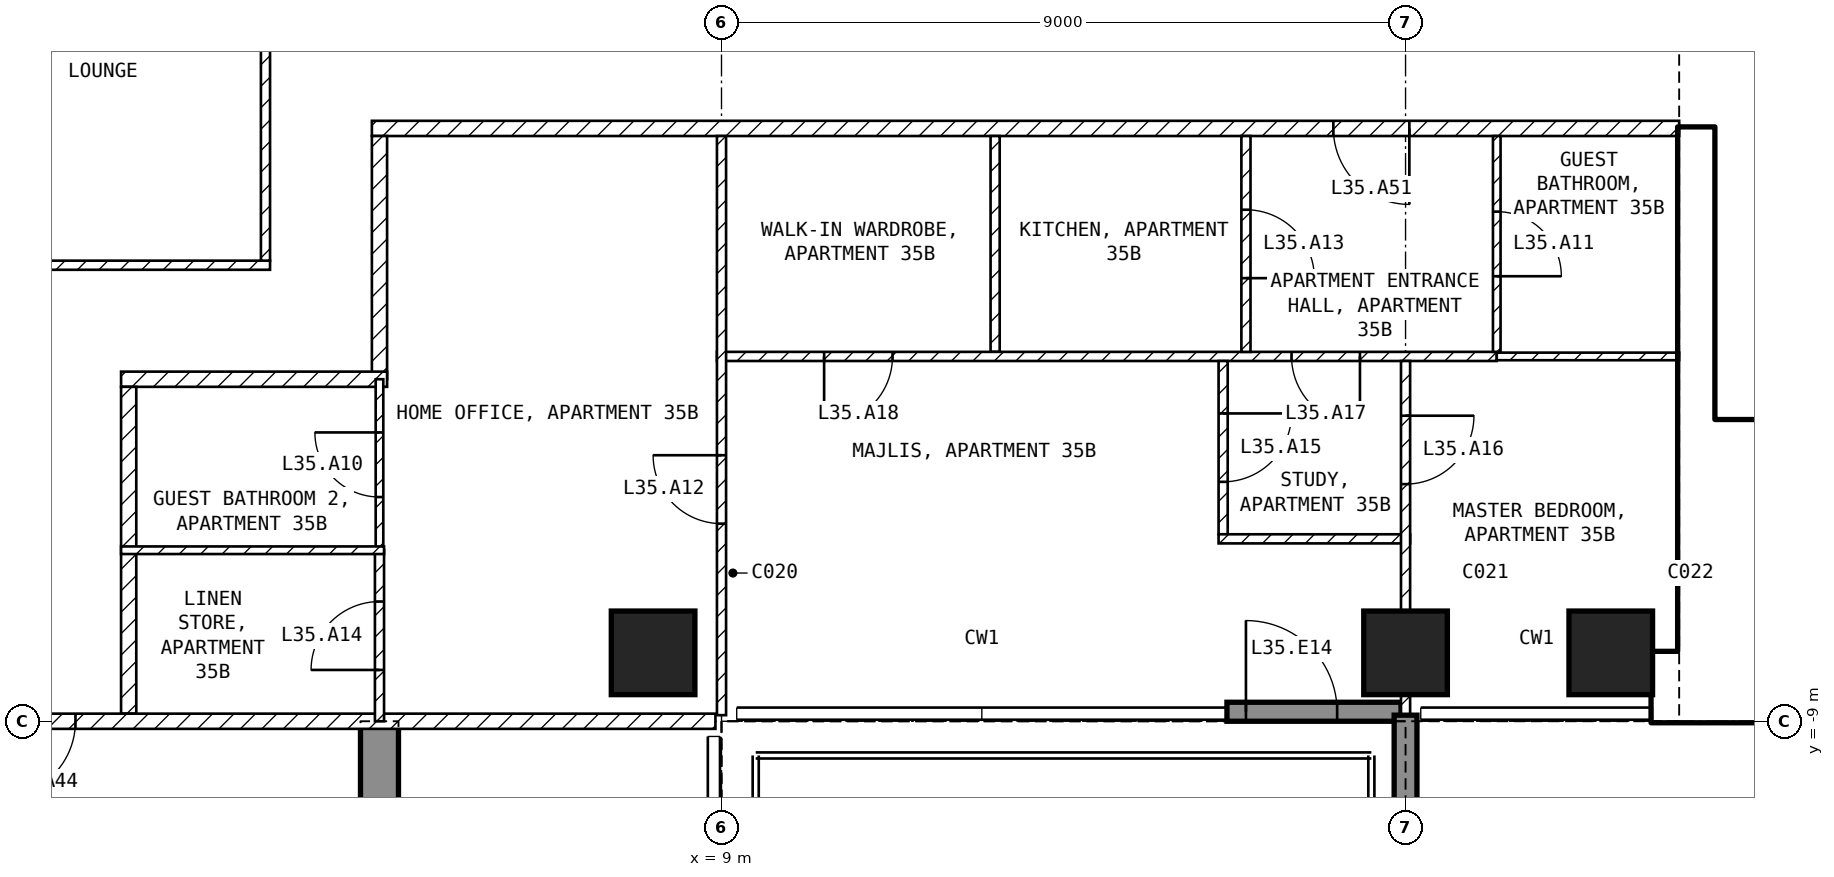
"""IFC4 building model, lengths in metres.
Left out: names, types, materials, properties, quantities, classifications, styles, units other than length and angle.
Written with IfcOpenShell. Run it as: python <this file> out.ifc"""

import sys

from ifc_helpers import new_model, si_unit, direction, frame, frame_2d, origin, origin_2d, place, context, subcontext, project, spatial, polyline, rectangle, outline, extrude, element, fill, save


model = new_model("IFC4")
c1 = context("Model", 3, precision=1e-05, world=origin(), true_north=direction((0.0, 1.0)))
c2 = subcontext(c1, "Body", "Model", "MODEL_VIEW")
j1 = project(units=[si_unit("LENGTHUNIT", "METRE"), si_unit("PLANEANGLEUNIT", "RADIAN")], contexts=[c1])
p1 = place(None, origin())
s1 = spatial("IfcSite", under=j1, at=p1, CompositionType="ELEMENT")
p2 = place(p1, origin())
s2 = spatial("IfcBuilding", under=s1, at=p2, CompositionType="ELEMENT")
p3 = place(p2, frame((0.0, 0.0, 144.4)))
s3 = spatial("IfcBuildingStorey", under=s2, at=p3, CompositionType="ELEMENT", Elevation=144.4)
for number, where, z_axis, x_axis in (
    (1, (8.1, -8.1, -0.25), (0.0, 0.0, 1.0), (1.0, 0.0, 0.0)),
    (2, (18.0, -8.1, -0.25), (0.0, 0.0, 1.0), (1.0, 0.0, 0.0)),
    (3, (20.7, -8.1, -0.25), (0.0, 0.0, 1.0), (1.0, 0.0, 0.0)),
):
    element("IfcColumn", number, at=place(p3, frame(where, z_axis=z_axis, x_axis=x_axis)), inside=s3, PredefinedType="COLUMN", context=c2, shape_type="SweptSolid", body=[
        extrude(rectangle(XDim=1.1, YDim=1.1, at=origin_2d()), origin(), (0.0, 0.0, 1.0), 3.5),
    ])
p4 = place(p3, frame((4.25, -20.15, -0.25), z_axis=(1.0, 0.0, 0.0), x_axis=(0.0, 1.0, 0.0)))
e4 = element("IfcWall", 4, at=p4, inside=s3, PredefinedType="SHEAR", context=c2, shape_type="SweptSolid", body=[
    extrude(outline(polyline([(0.0, 0.0), (6.65, 0.0), (6.65, 2.65), (9.05, 2.65), (9.05, 0.0), (11.15, 0.0), (11.15, 3.5), (0.0, 3.5), (0.0, 0.0)])), origin(), (0.0, 0.0, 1.0), 0.5),
])
p5 = place(p3, frame((15.65, -8.875, 0.0), z_axis=(0.0, 0.0, 1.0), x_axis=(1.0, 0.0, 0.0)))
e5 = element("IfcWall", 5, at=p5, inside=s3, PredefinedType="SOLIDWALL", context=c2, shape_type="SweptSolid", body=[
    extrude(rectangle(XDim=2.29, YDim=0.25, at=frame_2d((1.145, 0.0))), origin(), (0.0, 0.0, 1.0), 3.25),
])
p6 = place(p5, frame((0.25, 0.0, 0.0)))
e6 = element("IfcOpeningElement", 6, at=p6, cuts=e5, PredefinedType="OPENING", context=c2, shape_type="SweptSolid", body=[
    extrude(rectangle(XDim=1.2, YDim=2.4, at=frame_2d((0.6, 1.2))), frame((0.0, 0.135, 0.0), z_axis=(0.0, -1.0, 0.0), x_axis=(1.0, 0.0, 0.0)), (0.0, 0.0, 1.0), 0.27),
])
p7 = place(p3, frame((18.0, -8.92, 0.0), z_axis=(0.0, 0.0, 1.0), x_axis=(0.0, -1.0, 0.0)))
e7 = element("IfcWall", 7, at=p7, inside=s3, PredefinedType="SOLIDWALL", context=c2, shape_type="SweptSolid", body=[
    extrude(rectangle(XDim=2.82, YDim=0.3, at=frame_2d((1.41, 0.0))), origin(), (0.0, 0.0, 1.0), 3.25),
])
p8 = place(p3, frame((21.25, -8.55, 0.0), z_axis=(0.0, 0.0, 1.0), x_axis=(1.0, 0.0, 0.0)))
e8 = element("IfcWall", 8, at=p8, inside=s3, PredefinedType="SHEAR", context=c2, shape_type="SweptSolid", body=[
    extrude(rectangle(XDim=8.95, YDim=0.9, at=frame_2d((4.475, 0.0))), origin(), (0.0, 0.0, 1.0), 3.25),
])
p9 = place(p3, frame((21.825, -8.1, 0.0), z_axis=(0.0, 0.0, 1.0), x_axis=(0.0, 1.0, 0.0)))
e9 = element("IfcWall", 9, at=p9, inside=s3, PredefinedType="SHEAR", context=c2, shape_type="SweptSolid", body=[
    extrude(rectangle(XDim=6.9, YDim=0.45, at=frame_2d((3.45, 0.0))), origin(), (0.0, 0.0, 1.0), 3.25),
])
p10 = place(p3, frame((22.05, -5.15, 0.0), z_axis=(0.0, 0.0, 1.0), x_axis=(1.0, 0.0, 0.0)))
e10 = element("IfcWall", 10, at=p10, inside=s3, PredefinedType="SOLIDWALL", context=c2, shape_type="SweptSolid", body=[
    extrude(rectangle(XDim=6.3, YDim=0.2, at=frame_2d((3.15, 0.0))), origin(), (0.0, 0.0, 1.0), 3.25),
])
p11 = place(p10, frame((0.2, 0.0, 0.0)))
e11 = element("IfcOpeningElement", 11, at=p11, cuts=e10, PredefinedType="OPENING", context=c2, shape_type="SweptSolid", body=[
    extrude(rectangle(XDim=1.0, YDim=2.1, at=frame_2d((0.5, 1.05))), frame((0.0, 0.11, 0.0), z_axis=(0.0, -1.0, 0.0), x_axis=(1.0, 0.0, 0.0)), (0.0, 0.0, 1.0), 0.22),
])
p12 = place(p3, frame((-3.06, -3.0, 0.0), z_axis=(0.0, 0.0, 1.0), x_axis=(1.0, 0.0, 0.0)))
e12 = element("IfcWall", 12, at=p12, inside=s3, PredefinedType="PARTITIONING", context=c2, shape_type="SweptSolid", body=[
    extrude(rectangle(XDim=6.12, YDim=0.12, at=frame_2d((3.06, 0.0))), origin(), (0.0, 0.0, 1.0), 3.25),
])
p13 = place(p3, frame((3.0, -2.94, 0.0), z_axis=(0.0, 0.0, 1.0), x_axis=(0.0, 1.0, 0.0)))
e13 = element("IfcWall", 13, at=p13, inside=s3, PredefinedType="PARTITIONING", context=c2, shape_type="SweptSolid", body=[
    extrude(rectangle(XDim=5.88, YDim=0.12, at=frame_2d((2.94, 0.0))), origin(), (0.0, 0.0, 1.0), 3.25),
])
p14 = place(p3, frame((21.6, -1.2, 0.0), z_axis=(0.0, 0.0, 1.0), x_axis=(-1.0, 0.0, 0.0)))
e14 = element("IfcWall", 14, at=p14, inside=s3, PredefinedType="PARTITIONING", context=c2, shape_type="SweptSolid", body=[
    extrude(rectangle(XDim=17.2, YDim=0.2, at=frame_2d((8.6, 0.0))), origin(), (0.0, 0.0, 1.0), 3.25),
])
p15 = place(p14, frame((3.55, 0.0, 0.0)))
e15 = element("IfcOpeningElement", 15, at=p15, cuts=e14, PredefinedType="OPENING", context=c2, shape_type="SweptSolid", body=[
    extrude(rectangle(XDim=1.0, YDim=2.1, at=frame_2d((0.5, 1.05))), frame((0.0, 0.11, 0.0), z_axis=(0.0, -1.0, 0.0), x_axis=(1.0, 0.0, 0.0)), (0.0, 0.0, 1.0), 0.22),
])
p16 = place(p3, frame((4.5, -1.3, 0.0), z_axis=(0.0, 0.0, 1.0), x_axis=(0.0, -1.0, 0.0)))
e16 = element("IfcWall", 16, at=p16, inside=s3, PredefinedType="PARTITIONING", context=c2, shape_type="SweptSolid", body=[
    extrude(rectangle(XDim=3.2, YDim=0.2, at=frame_2d((1.6, 0.0))), origin(), (0.0, 0.0, 1.0), 3.25),
])
p17 = place(p3, frame((4.6, -4.5, 0.0), z_axis=(0.0, 0.0, 1.0), x_axis=(-1.0, 0.0, 0.0)))
e17 = element("IfcWall", 17, at=p17, inside=s3, PredefinedType="PARTITIONING", context=c2, shape_type="SweptSolid", body=[
    extrude(rectangle(XDim=3.5, YDim=0.2, at=frame_2d((1.75, 0.0))), origin(), (0.0, 0.0, 1.0), 3.25),
])
p18 = place(p3, frame((1.2, -4.6, 0.0), z_axis=(0.0, 0.0, 1.0), x_axis=(0.0, -1.0, 0.0)))
e18 = element("IfcWall", 18, at=p18, inside=s3, PredefinedType="PARTITIONING", context=c2, shape_type="SweptSolid", body=[
    extrude(rectangle(XDim=4.3, YDim=0.2, at=frame_2d((2.15, 0.0))), origin(), (0.0, 0.0, 1.0), 3.25),
])
p19 = place(p3, frame((8.92, -9.0, 0.0), z_axis=(0.0, 0.0, 1.0), x_axis=(-1.0, 0.0, 0.0)))
e19 = element("IfcWall", 19, at=p19, inside=s3, PredefinedType="PARTITIONING", context=c2, shape_type="SweptSolid", body=[
    extrude(rectangle(XDim=17.84, YDim=0.2, at=frame_2d((8.92, 0.0))), origin(), (0.0, 0.0, 1.0), 3.25),
])
p20 = place(p19, frame((8.42, 0.0, 0.0)))
e20 = element("IfcOpeningElement", 20, at=p20, cuts=e19, PredefinedType="OPENING", context=c2, shape_type="SweptSolid", body=[
    extrude(rectangle(XDim=1.0, YDim=2.1, at=frame_2d((0.5, 1.05))), frame((0.0, 0.11, 0.0), z_axis=(0.0, -1.0, 0.0), x_axis=(1.0, 0.0, 0.0)), (0.0, 0.0, 1.0), 0.22),
])
p21 = place(p3, frame((12.6, -1.3, 0.0), z_axis=(0.0, 0.0, 1.0), x_axis=(0.0, -1.0, 0.0)))
e21 = element("IfcWall", 21, at=p21, inside=s3, PredefinedType="PARTITIONING", context=c2, shape_type="SweptSolid", body=[
    extrude(rectangle(XDim=2.84, YDim=0.12, at=frame_2d((1.42, 0.0))), origin(), (0.0, 0.0, 1.0), 3.25),
])
p22 = place(p3, frame((19.2, -4.2, 0.0), z_axis=(0.0, 0.0, 1.0), x_axis=(-1.0, 0.0, 0.0)))
e22 = element("IfcWall", 22, at=p22, inside=s3, PredefinedType="PARTITIONING", context=c2, shape_type="SweptSolid", body=[
    extrude(rectangle(XDim=10.26, YDim=0.12, at=frame_2d((5.13, 0.0))), origin(), (0.0, 0.0, 1.0), 3.25),
])
p23 = place(p22, frame((1.8, 0.0, 0.0)))
e23 = element("IfcOpeningElement", 23, at=p23, cuts=e22, PredefinedType="OPENING", context=c2, shape_type="SweptSolid", body=[
    extrude(rectangle(XDim=0.9, YDim=2.1, at=frame_2d((0.45, 1.05))), frame((0.0, 0.07, 0.0), z_axis=(0.0, -1.0, 0.0), x_axis=(1.0, 0.0, 0.0)), (0.0, 0.0, 1.0), 0.14),
])
p24 = place(p22, frame((7.95, 0.0, 0.0)))
e24 = element("IfcOpeningElement", 24, at=p24, cuts=e22, PredefinedType="OPENING", context=c2, shape_type="SweptSolid", body=[
    extrude(rectangle(XDim=0.9, YDim=2.1, at=frame_2d((0.45, 1.05))), frame((0.0, 0.07, 0.0), z_axis=(0.0, -1.0, 0.0), x_axis=(1.0, 0.0, 0.0)), (0.0, 0.0, 1.0), 0.14),
])
p25 = place(p3, frame((9.0, -8.92, 0.0), z_axis=(0.0, 0.0, 1.0), x_axis=(0.0, 1.0, 0.0)))
e25 = element("IfcWall", 25, at=p25, inside=s3, PredefinedType="PARTITIONING", context=c2, shape_type="SweptSolid", body=[
    extrude(rectangle(XDim=7.62, YDim=0.12, at=frame_2d((3.81, 0.0))), origin(), (0.0, 0.0, 1.0), 3.25),
])
p26 = place(p25, frame((2.52, 0.0, 0.0)))
e26 = element("IfcOpeningElement", 26, at=p26, cuts=e25, PredefinedType="OPENING", context=c2, shape_type="SweptSolid", body=[
    extrude(rectangle(XDim=0.9, YDim=2.1, at=frame_2d((0.45, 1.05))), frame((0.0, 0.07, 0.0), z_axis=(0.0, -1.0, 0.0), x_axis=(1.0, 0.0, 0.0)), (0.0, 0.0, 1.0), 0.14),
])
p27 = place(p3, frame((15.9, -1.3, 0.0), z_axis=(0.0, 0.0, 1.0), x_axis=(0.0, -1.0, 0.0)))
e27 = element("IfcWall", 27, at=p27, inside=s3, PredefinedType="PARTITIONING", context=c2, shape_type="SweptSolid", body=[
    extrude(rectangle(XDim=2.84, YDim=0.12, at=frame_2d((1.42, 0.0))), origin(), (0.0, 0.0, 1.0), 3.25),
])
p28 = place(p27, frame((0.97, 0.0, 0.0)))
e28 = element("IfcOpeningElement", 28, at=p28, cuts=e27, PredefinedType="OPENING", context=c2, shape_type="SweptSolid", body=[
    extrude(rectangle(XDim=0.9, YDim=2.1, at=frame_2d((0.45, 1.05))), frame((0.0, 0.07, 0.0), z_axis=(0.0, -1.0, 0.0), x_axis=(1.0, 0.0, 0.0)), (0.0, 0.0, 1.0), 0.14),
])
p29 = place(p3, frame((19.2, -1.3, 0.0), z_axis=(0.0, 0.0, 1.0), x_axis=(0.0, -1.0, 0.0)))
e29 = element("IfcWall", 29, at=p29, inside=s3, PredefinedType="PARTITIONING", context=c2, shape_type="SweptSolid", body=[
    extrude(rectangle(XDim=2.84, YDim=0.1, at=frame_2d((1.42, 0.0))), origin(), (0.0, 0.0, 1.0), 3.25),
])
p30 = place(p29, frame((0.995, 0.0, 0.0)))
e30 = element("IfcOpeningElement", 30, at=p30, cuts=e29, PredefinedType="OPENING", context=c2, shape_type="SweptSolid", body=[
    extrude(rectangle(XDim=0.85, YDim=2.1, at=frame_2d((0.425, 1.05))), frame((0.0, 0.06, 0.0), z_axis=(0.0, -1.0, 0.0), x_axis=(1.0, 0.0, 0.0)), (0.0, 0.0, 1.0), 0.12),
])
p31 = place(p3, frame((21.6, -4.2, 0.0), z_axis=(0.0, 0.0, 1.0), x_axis=(-1.0, 0.0, 0.0)))
e31 = element("IfcWall", 31, at=p31, inside=s3, PredefinedType="PARTITIONING", context=c2, shape_type="SweptSolid", body=[
    extrude(rectangle(XDim=2.4, YDim=0.1, at=frame_2d((1.2, 0.0))), origin(), (0.0, 0.0, 1.0), 3.25),
])
p32 = place(p3, frame((15.6, -4.26, 0.0), z_axis=(0.0, 0.0, 1.0), x_axis=(0.0, -1.0, 0.0)))
e32 = element("IfcWall", 32, at=p32, inside=s3, PredefinedType="PARTITIONING", context=c2, shape_type="SweptSolid", body=[
    extrude(rectangle(XDim=2.28, YDim=0.12, at=frame_2d((1.14, 0.0))), origin(), (0.0, 0.0, 1.0), 3.25),
])
p33 = place(p32, frame((0.69, 0.0, 0.0)))
e33 = element("IfcOpeningElement", 33, at=p33, cuts=e32, PredefinedType="OPENING", context=c2, shape_type="SweptSolid", body=[
    extrude(rectangle(XDim=0.9, YDim=2.1, at=frame_2d((0.45, 1.05))), frame((0.0, 0.07, 0.0), z_axis=(0.0, -1.0, 0.0), x_axis=(1.0, 0.0, 0.0)), (0.0, 0.0, 1.0), 0.14),
])
p34 = place(p3, frame((15.54, -6.6, 0.0), z_axis=(0.0, 0.0, 1.0), x_axis=(1.0, 0.0, 0.0)))
e34 = element("IfcWall", 34, at=p34, inside=s3, PredefinedType="PARTITIONING", context=c2, shape_type="SweptSolid", body=[
    extrude(rectangle(XDim=2.52, YDim=0.12, at=frame_2d((1.26, 0.0))), origin(), (0.0, 0.0, 1.0), 3.25),
])
p35 = place(p3, frame((18.0, -4.26, 0.0), z_axis=(0.0, 0.0, 1.0), x_axis=(0.0, -1.0, 0.0)))
e35 = element("IfcWall", 35, at=p35, inside=s3, PredefinedType="PARTITIONING", context=c2, shape_type="SweptSolid", body=[
    extrude(rectangle(XDim=4.66, YDim=0.12, at=frame_2d((2.33, 0.0))), origin(), (0.0, 0.0, 1.0), 2.414),
])
p36 = place(p35, frame((0.72, 0.0, 0.0)))
e36 = element("IfcOpeningElement", 36, at=p36, cuts=e35, PredefinedType="OPENING", context=c2, shape_type="SweptSolid", body=[
    extrude(rectangle(XDim=0.9, YDim=2.1, at=frame_2d((0.45, 1.05))), frame((0.0, 0.07, 0.0), z_axis=(0.0, -1.0, 0.0), x_axis=(1.0, 0.0, 0.0)), (0.0, 0.0, 1.0), 0.14),
])
p37 = place(p3, frame((4.5, -6.75, 0.0), z_axis=(0.0, 0.0, 1.0), x_axis=(0.0, 1.0, 0.0)))
e37 = element("IfcWall", 37, at=p37, inside=s3, PredefinedType="PARTITIONING", context=c2, shape_type="SweptSolid", body=[
    extrude(rectangle(XDim=2.25, YDim=0.1, at=frame_2d((1.125, 0.0))), origin(), (0.0, 0.0, 1.0), 3.25),
])
p38 = place(p37, frame((0.7, 0.0, 0.0)))
e38 = element("IfcOpeningElement", 38, at=p38, cuts=e37, PredefinedType="OPENING", context=c2, shape_type="SweptSolid", body=[
    extrude(rectangle(XDim=0.85, YDim=2.1, at=frame_2d((0.425, 1.05))), frame((0.0, 0.06, 0.0), z_axis=(0.0, -1.0, 0.0), x_axis=(1.0, 0.0, 0.0)), (0.0, 0.0, 1.0), 0.12),
])
p39 = place(p3, frame((4.5, -9.0, 0.0), z_axis=(0.0, 0.0, 1.0), x_axis=(0.0, 1.0, 0.0)))
e39 = element("IfcWall", 39, at=p39, inside=s3, PredefinedType="PARTITIONING", context=c2, shape_type="SweptSolid", body=[
    extrude(rectangle(XDim=2.25, YDim=0.12, at=frame_2d((1.125, 0.0))), origin(), (0.0, 0.0, 1.0), 3.25),
])
p40 = place(p39, frame((0.675, 0.0, 0.0)))
e40 = element("IfcOpeningElement", 40, at=p40, cuts=e39, PredefinedType="OPENING", context=c2, shape_type="SweptSolid", body=[
    extrude(rectangle(XDim=0.9, YDim=2.1, at=frame_2d((0.45, 1.05))), frame((0.0, 0.07, 0.0), z_axis=(0.0, -1.0, 0.0), x_axis=(1.0, 0.0, 0.0)), (0.0, 0.0, 1.0), 0.14),
])
p41 = place(p3, frame((4.56, -6.75, 0.0), z_axis=(0.0, 0.0, 1.0), x_axis=(-1.0, 0.0, 0.0)))
e41 = element("IfcWall", 41, at=p41, inside=s3, PredefinedType="PARTITIONING", context=c2, shape_type="SweptSolid", body=[
    extrude(rectangle(XDim=3.46, YDim=0.1, at=frame_2d((1.73, 0.0))), origin(), (0.0, 0.0, 1.0), 3.25),
])
p42 = place(p6, origin())
e42 = element("IfcDoor", 42, at=p42, inside=s3, OperationType="SINGLE_SWING_LEFT", PredefinedType="DOOR", context=c2, shape_type="SweptSolid", body=[
    extrude(rectangle(XDim=1.2, YDim=2.4, at=frame_2d((0.6, 1.2))), frame((0.0, 0.025, 0.0), z_axis=(0.0, -1.0, 0.0), x_axis=(1.0, 0.0, 0.0)), (0.0, 0.0, 1.0), 0.05),
])
fill(e6, e42)
p43 = place(p11, origin())
e43 = element("IfcDoor", 43, at=p43, inside=s3, OperationType="SINGLE_SWING_LEFT", PredefinedType="DOOR", context=c2, shape_type="SweptSolid", body=[
    extrude(rectangle(XDim=1.0, YDim=2.1, at=frame_2d((0.5, 1.05))), frame((0.0, 0.025, 0.0), z_axis=(0.0, -1.0, 0.0), x_axis=(1.0, 0.0, 0.0)), (0.0, 0.0, 1.0), 0.05),
])
fill(e11, e43)
p44 = place(p38, origin())
e44 = element("IfcDoor", 44, at=p44, inside=s3, OperationType="SINGLE_SWING_RIGHT", PredefinedType="DOOR", context=c2, shape_type="SweptSolid", body=[
    extrude(rectangle(XDim=0.85, YDim=2.1, at=frame_2d((0.425, 1.05))), frame((0.0, 0.025, 0.0), z_axis=(0.0, -1.0, 0.0), x_axis=(1.0, 0.0, 0.0)), (0.0, 0.0, 1.0), 0.05),
])
fill(e38, e44)
p45 = place(p30, origin())
e45 = element("IfcDoor", 45, at=p45, inside=s3, OperationType="SINGLE_SWING_RIGHT", PredefinedType="DOOR", context=c2, shape_type="SweptSolid", body=[
    extrude(rectangle(XDim=0.85, YDim=2.1, at=frame_2d((0.425, 1.05))), frame((0.0, 0.025, 0.0), z_axis=(0.0, -1.0, 0.0), x_axis=(1.0, 0.0, 0.0)), (0.0, 0.0, 1.0), 0.05),
])
fill(e30, e45)
p46 = place(p26, origin())
e46 = element("IfcDoor", 46, at=p46, inside=s3, OperationType="SINGLE_SWING_RIGHT", PredefinedType="DOOR", context=c2, shape_type="SweptSolid", body=[
    extrude(rectangle(XDim=0.9, YDim=2.1, at=frame_2d((0.45, 1.05))), frame((0.0, 0.025, 0.0), z_axis=(0.0, -1.0, 0.0), x_axis=(1.0, 0.0, 0.0)), (0.0, 0.0, 1.0), 0.05),
])
fill(e26, e46)
p47 = place(p28, origin())
e47 = element("IfcDoor", 47, at=p47, inside=s3, OperationType="SINGLE_SWING_RIGHT", PredefinedType="DOOR", context=c2, shape_type="SweptSolid", body=[
    extrude(rectangle(XDim=0.9, YDim=2.1, at=frame_2d((0.45, 1.05))), frame((0.0, 0.025, 0.0), z_axis=(0.0, -1.0, 0.0), x_axis=(1.0, 0.0, 0.0)), (0.0, 0.0, 1.0), 0.05),
])
fill(e28, e47)
p48 = place(p40, origin())
e48 = element("IfcDoor", 48, at=p48, inside=s3, OperationType="SINGLE_SWING_LEFT", PredefinedType="DOOR", context=c2, shape_type="SweptSolid", body=[
    extrude(rectangle(XDim=0.9, YDim=2.1, at=frame_2d((0.45, 1.05))), frame((0.0, 0.025, 0.0), z_axis=(0.0, -1.0, 0.0), x_axis=(1.0, 0.0, 0.0)), (0.0, 0.0, 1.0), 0.05),
])
fill(e40, e48)
p49 = place(p33, origin())
e49 = element("IfcDoor", 49, at=p49, inside=s3, OperationType="SINGLE_SWING_LEFT", PredefinedType="DOOR", context=c2, shape_type="SweptSolid", body=[
    extrude(rectangle(XDim=0.9, YDim=2.1, at=frame_2d((0.45, 1.05))), frame((0.0, 0.025, 0.0), z_axis=(0.0, -1.0, 0.0), x_axis=(1.0, 0.0, 0.0)), (0.0, 0.0, 1.0), 0.05),
])
fill(e33, e49)
p50 = place(p36, origin())
e50 = element("IfcDoor", 50, at=p50, inside=s3, OperationType="SINGLE_SWING_LEFT", PredefinedType="DOOR", context=c2, shape_type="SweptSolid", body=[
    extrude(rectangle(XDim=0.9, YDim=2.1, at=frame_2d((0.45, 1.05))), frame((0.0, 0.025, 0.0), z_axis=(0.0, -1.0, 0.0), x_axis=(1.0, 0.0, 0.0)), (0.0, 0.0, 1.0), 0.05),
])
fill(e36, e50)
p51 = place(p23, origin())
e51 = element("IfcDoor", 51, at=p51, inside=s3, OperationType="SINGLE_SWING_LEFT", PredefinedType="DOOR", context=c2, shape_type="SweptSolid", body=[
    extrude(rectangle(XDim=0.9, YDim=2.1, at=frame_2d((0.45, 1.05))), frame((0.0, 0.025, 0.0), z_axis=(0.0, -1.0, 0.0), x_axis=(1.0, 0.0, 0.0)), (0.0, 0.0, 1.0), 0.05),
])
fill(e23, e51)
p52 = place(p24, origin())
e52 = element("IfcDoor", 52, at=p52, inside=s3, OperationType="SINGLE_SWING_RIGHT", PredefinedType="DOOR", context=c2, shape_type="SweptSolid", body=[
    extrude(rectangle(XDim=0.9, YDim=2.1, at=frame_2d((0.45, 1.05))), frame((0.0, 0.025, 0.0), z_axis=(0.0, -1.0, 0.0), x_axis=(1.0, 0.0, 0.0)), (0.0, 0.0, 1.0), 0.05),
])
fill(e24, e52)
p53 = place(p20, origin())
e53 = element("IfcDoor", 53, at=p53, inside=s3, OperationType="SINGLE_SWING_RIGHT", PredefinedType="DOOR", context=c2, shape_type="SweptSolid", body=[
    extrude(rectangle(XDim=1.0, YDim=2.1, at=frame_2d((0.5, 1.05))), frame((0.0, 0.025, 0.0), z_axis=(0.0, -1.0, 0.0), x_axis=(1.0, 0.0, 0.0)), (0.0, 0.0, 1.0), 0.05),
])
fill(e20, e53)
p54 = place(p15, origin())
e54 = element("IfcDoor", 54, at=p54, inside=s3, OperationType="SINGLE_SWING_LEFT", PredefinedType="DOOR", context=c2, shape_type="SweptSolid", body=[
    extrude(rectangle(XDim=1.0, YDim=2.1, at=frame_2d((0.5, 1.05))), frame((0.0, 0.025, 0.0), z_axis=(0.0, -1.0, 0.0), x_axis=(1.0, 0.0, 0.0)), (0.0, 0.0, 1.0), 0.05),
])
fill(e15, e54)
save(model, sys.argv[1])
